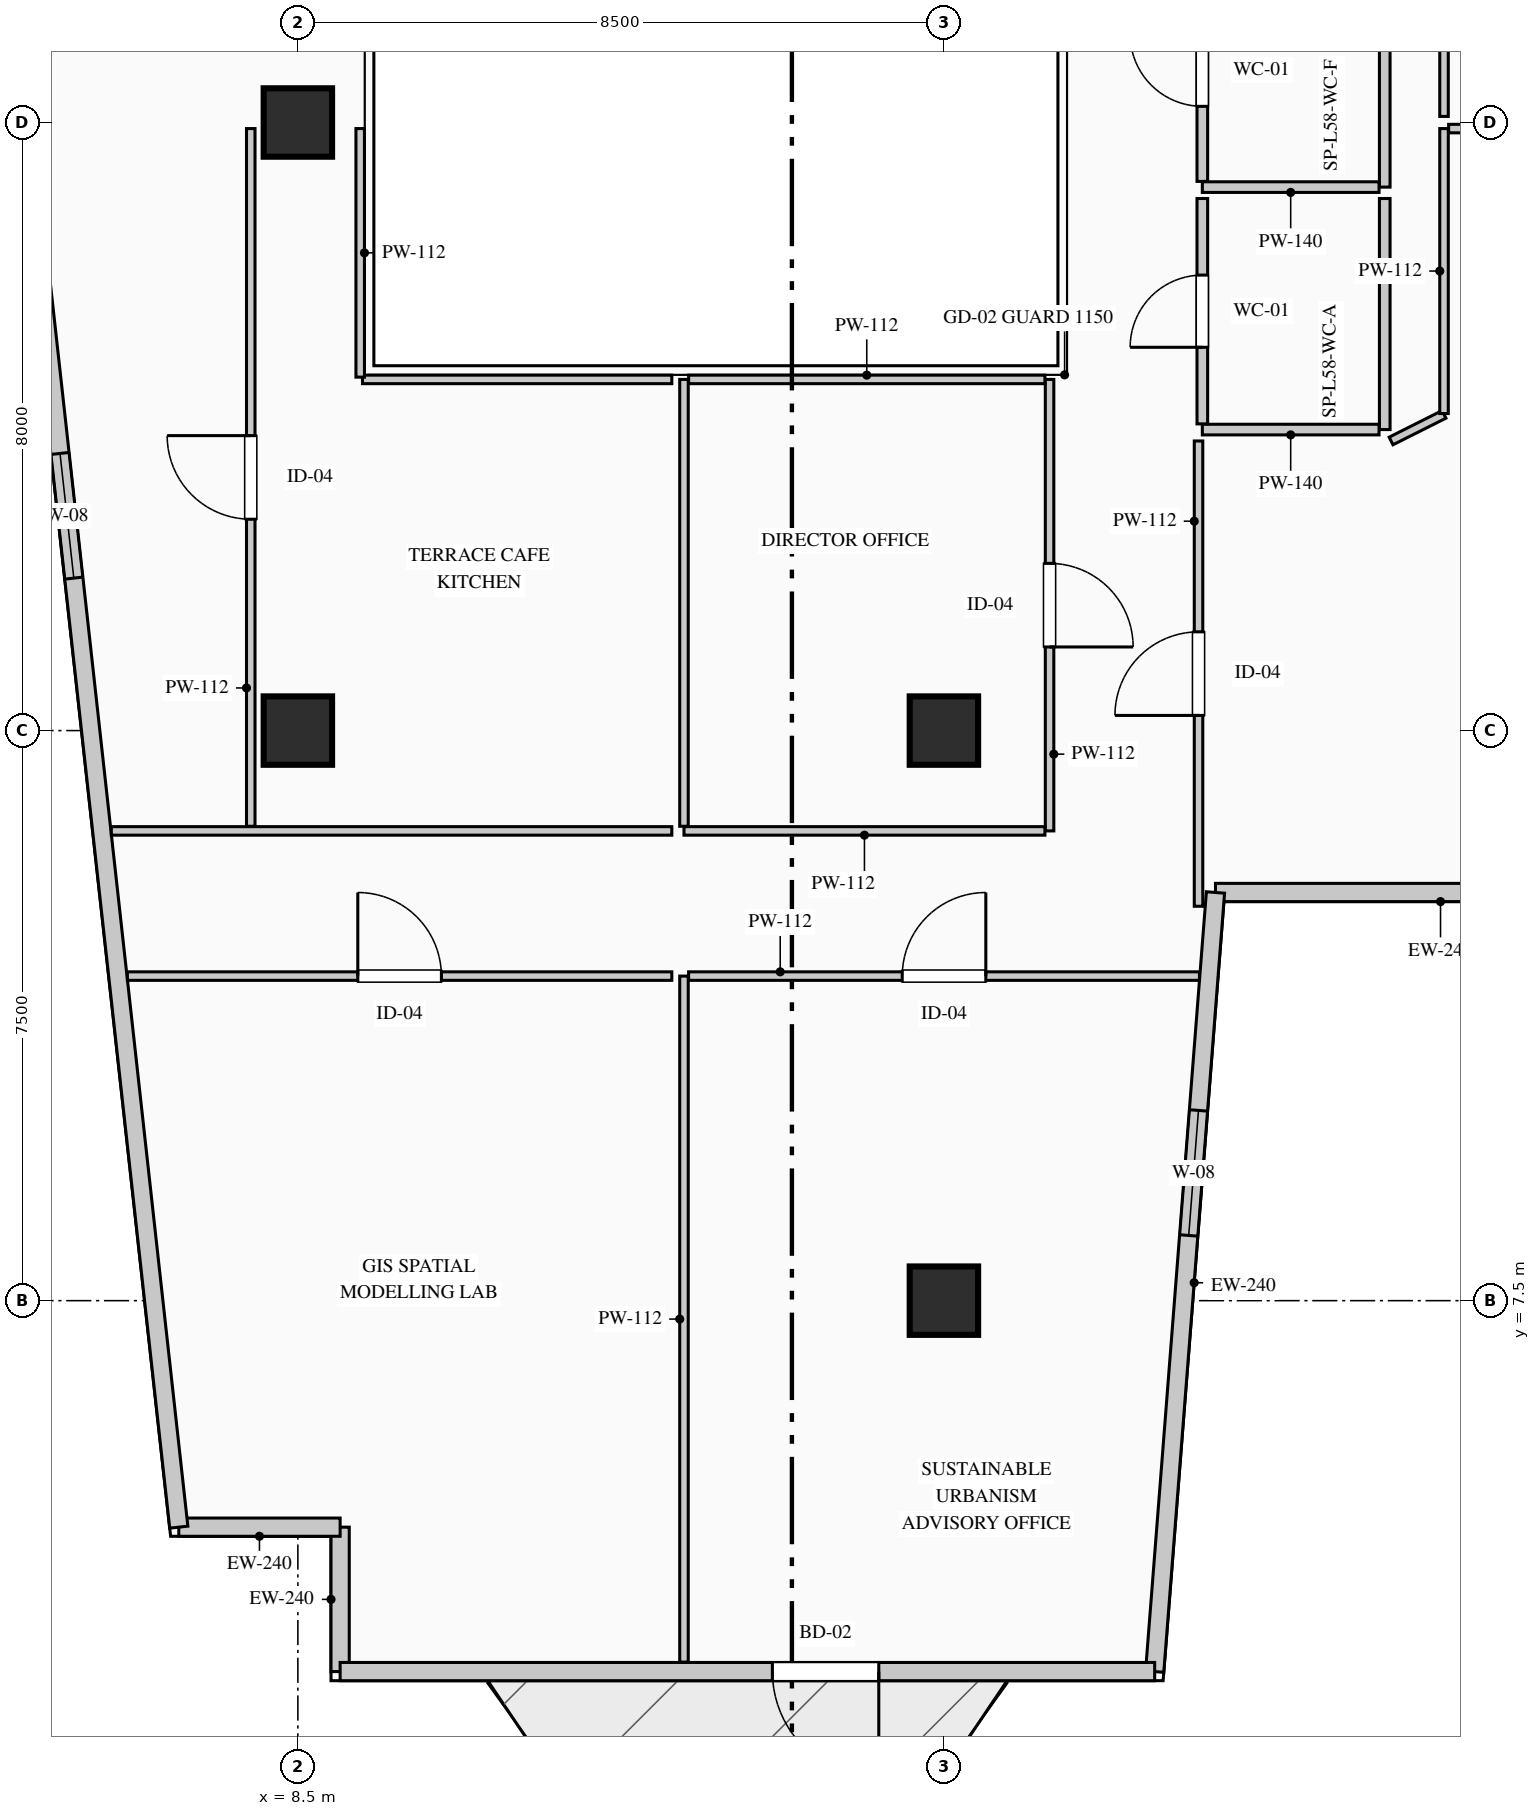
"""IFC4 building model, lengths in metres.
Left out: names, types, materials, properties, quantities, classifications, styles, units other than length and angle.
Written with IfcOpenShell. Run it as: python <this file> out.ifc"""

import sys

from ifc_helpers import new_model, si_unit, direction, frame, frame_2d, origin, origin_2d, place, context, subcontext, project, spatial, rectangle, extrude, element, fill, save


model = new_model("IFC4")
c1 = context("Model", 3, precision=1e-05, world=origin(), true_north=direction((0.0, 1.0)))
c2 = subcontext(c1, "Body", "Model", "MODEL_VIEW")
j1 = project(units=[si_unit("LENGTHUNIT", "METRE"), si_unit("PLANEANGLEUNIT", "RADIAN")], contexts=[c1])
p1 = place(None, origin())
s1 = spatial("IfcSite", under=j1, at=p1, CompositionType="ELEMENT")
p2 = place(p1, origin())
s2 = spatial("IfcBuilding", under=s1, at=p2, CompositionType="ELEMENT")
p3 = place(p2, frame((0.0, 0.0, 243.0)))
s3 = spatial("IfcBuildingStorey", under=s2, at=p3, CompositionType="ELEMENT", Elevation=243.0)
for number, where, z_axis, x_axis in (
    (1, (8.5, 15.0, 0.0), (0.0, 0.0, 1.0), (1.0, 0.0, 0.0)),
    (2, (8.5, 23.0, 0.0), (0.0, 0.0, 1.0), (1.0, 0.0, 0.0)),
    (3, (17.0, 7.5, 0.0), (0.0, 0.0, 1.0), (1.0, 0.0, 0.0)),
    (4, (17.0, 15.0, 0.0), (0.0, 0.0, 1.0), (1.0, 0.0, 0.0)),
):
    element("IfcColumn", number, at=place(p3, frame(where, z_axis=z_axis, x_axis=x_axis)), inside=s3, PredefinedType="COLUMN", context=c2, shape_type="SweptSolid", body=[
        extrude(rectangle(XDim=0.9, YDim=0.9, at=origin_2d()), origin(), (0.0, 0.0, 1.0), 3.95),
    ])
p4 = place(p3, frame((9.056, 2.62, 0.0), z_axis=(0.0, 0.0, 1.0), x_axis=(0.0, 1.0, 0.0)))
e5 = element("IfcWall", 5, at=p4, inside=s3, PredefinedType="STANDARD", context=c2, shape_type="SweptSolid", body=[
    extrude(rectangle(XDim=1.9, YDim=0.24, at=frame_2d((0.95, 0.0))), origin(), (0.0, 0.0, 1.0), 3.7),
])
p5 = place(p3, frame((9.056, 4.52, 0.0), z_axis=(0.0, 0.0, 1.0), x_axis=(-1.0, 0.0, 0.0)))
e6 = element("IfcWall", 6, at=p5, inside=s3, PredefinedType="STANDARD", context=c2, shape_type="SweptSolid", body=[
    extrude(rectangle(XDim=2.123, YDim=0.24, at=frame_2d((1.061, 0.0))), origin(), (0.0, 0.0, 1.0), 3.7),
])
p6 = place(p3, frame((6.933, 4.52, 0.0), z_axis=(0.0, 0.0, 1.0), x_axis=(-0.109965284523, 0.993935428587, 0.0)))
e7 = element("IfcWall", 7, at=p6, inside=s3, PredefinedType="STANDARD", context=c2, shape_type="SweptSolid", body=[
    extrude(rectangle(XDim=37.186, YDim=0.24, at=frame_2d((18.593, 0.0))), origin(), (0.0, 0.0, 1.0), 3.7),
])
p7 = place(p6, frame((12.562, 0.0, 0.9)))
e8 = element("IfcOpeningElement", 8, at=p7, cuts=e7, PredefinedType="OPENING", context=c2, shape_type="SweptSolid", body=[
    extrude(rectangle(XDim=1.65, YDim=1.95, at=frame_2d((0.825, 0.975))), frame((0.0, 0.13, 0.0), z_axis=(0.0, -1.0, 0.0), x_axis=(1.0, 0.0, 0.0)), (0.0, 0.0, 1.0), 0.26),
])
p8 = place(p3, frame((26.495, 12.87, 0.0), z_axis=(0.0, 0.0, 1.0), x_axis=(-1.0, 0.0, 0.0)))
e9 = element("IfcWall", 9, at=p8, inside=s3, PredefinedType="STANDARD", context=c2, shape_type="SweptSolid", body=[
    extrude(rectangle(XDim=5.922, YDim=0.24, at=frame_2d((2.961, 0.0))), origin(), (0.0, 0.0, 1.0), 3.7),
])
p9 = place(p3, frame((20.573, 12.87, 0.0), z_axis=(0.0, 0.0, 1.0), x_axis=(-0.077816860153, -0.996967670627, 0.0)))
e10 = element("IfcWall", 10, at=p9, inside=s3, PredefinedType="STANDARD", context=c2, shape_type="SweptSolid", body=[
    extrude(rectangle(XDim=10.281, YDim=0.24, at=frame_2d((5.141, 0.0))), origin(), (0.0, 0.0, 1.0), 3.7),
])
p10 = place(p9, frame((2.876, 0.0, 0.9)))
e11 = element("IfcOpeningElement", 11, at=p10, cuts=e10, PredefinedType="OPENING", context=c2, shape_type="SweptSolid", body=[
    extrude(rectangle(XDim=1.65, YDim=1.95, at=frame_2d((0.825, 0.975))), frame((0.0, 0.13, 0.0), z_axis=(0.0, -1.0, 0.0), x_axis=(1.0, 0.0, 0.0)), (0.0, 0.0, 1.0), 0.26),
])
p11 = place(p3, frame((19.773, 2.62, 0.0), z_axis=(0.0, 0.0, 1.0), x_axis=(-1.0, 0.0, 0.0)))
e12 = element("IfcWall", 12, at=p11, inside=s3, PredefinedType="STANDARD", context=c2, shape_type="SweptSolid", body=[
    extrude(rectangle(XDim=10.717, YDim=0.24, at=frame_2d((5.358, 0.0))), origin(), (0.0, 0.0, 1.0), 3.7),
])
p12 = place(p11, frame((3.63, 0.0, 0.0)))
e13 = element("IfcOpeningElement", 13, at=p12, cuts=e12, PredefinedType="OPENING", context=c2, shape_type="SweptSolid", body=[
    extrude(rectangle(XDim=1.4, YDim=2.2, at=frame_2d((0.7, 1.1))), frame((0.0, 0.13, 0.0), z_axis=(0.0, -1.0, 0.0), x_axis=(1.0, 0.0, 0.0)), (0.0, 0.0, 1.0), 0.26),
])
p13 = place(p3, frame((22.8, 25.15, 0.0), z_axis=(0.0, 0.0, 1.0), x_axis=(0.0, -1.0, 0.0)))
e14 = element("IfcWall", 14, at=p13, inside=s3, PredefinedType="PARTITIONING", context=c2, shape_type="SweptSolid", body=[
    extrude(rectangle(XDim=3.0, YDim=0.14, at=frame_2d((1.5, 0.0))), origin(), (0.0, 0.0, 1.0), 3.385),
])
p14 = place(p3, frame((22.725, 22.15, 0.0), z_axis=(0.0, 0.0, 1.0), x_axis=(-1.0, 0.0, 0.0)))
e15 = element("IfcWall", 15, at=p14, inside=s3, PredefinedType="PARTITIONING", context=c2, shape_type="SweptSolid", body=[
    extrude(rectangle(XDim=2.325, YDim=0.14, at=frame_2d((1.163, 0.0))), origin(), (0.0, 0.0, 1.0), 3.7),
])
p15 = place(p3, frame((20.4, 22.225, 0.0), z_axis=(0.0, 0.0, 1.0), x_axis=(0.0, 1.0, 0.0)))
e16 = element("IfcWall", 16, at=p15, inside=s3, PredefinedType="PARTITIONING", context=c2, shape_type="SweptSolid", body=[
    extrude(rectangle(XDim=2.925, YDim=0.14, at=frame_2d((1.462, 0.0))), origin(), (0.0, 0.0, 1.0), 3.7),
])
p16 = place(p15, frame((0.988, 0.0, 0.0)))
e17 = element("IfcOpeningElement", 17, at=p16, cuts=e16, PredefinedType="OPENING", context=c2, shape_type="SweptSolid", body=[
    extrude(rectangle(XDim=0.95, YDim=2.15, at=frame_2d((0.475, 1.075))), frame((0.0, 0.08, 0.0), z_axis=(0.0, -1.0, 0.0), x_axis=(1.0, 0.0, 0.0)), (0.0, 0.0, 1.0), 0.16),
])
p17 = place(p3, frame((22.8, 22.0, 0.0), z_axis=(0.0, 0.0, 1.0), x_axis=(0.0, -1.0, 0.0)))
e18 = element("IfcWall", 18, at=p17, inside=s3, PredefinedType="PARTITIONING", context=c2, shape_type="SweptSolid", body=[
    extrude(rectangle(XDim=3.04, YDim=0.14, at=frame_2d((1.52, 0.0))), origin(), (0.0, 0.0, 1.0), 3.385),
])
p18 = place(p3, frame((22.725, 18.96, 0.0), z_axis=(0.0, 0.0, 1.0), x_axis=(-1.0, 0.0, 0.0)))
e19 = element("IfcWall", 19, at=p18, inside=s3, PredefinedType="PARTITIONING", context=c2, shape_type="SweptSolid", body=[
    extrude(rectangle(XDim=2.325, YDim=0.14, at=frame_2d((1.163, 0.0))), origin(), (0.0, 0.0, 1.0), 3.7),
])
p19 = place(p3, frame((20.4, 19.035, 0.0), z_axis=(0.0, 0.0, 1.0), x_axis=(0.0, 1.0, 0.0)))
e20 = element("IfcWall", 20, at=p19, inside=s3, PredefinedType="PARTITIONING", context=c2, shape_type="SweptSolid", body=[
    extrude(rectangle(XDim=2.965, YDim=0.14, at=frame_2d((1.482, 0.0))), origin(), (0.0, 0.0, 1.0), 3.7),
])
p20 = place(p19, frame((1.008, 0.0, 0.0)))
e21 = element("IfcOpeningElement", 21, at=p20, cuts=e20, PredefinedType="OPENING", context=c2, shape_type="SweptSolid", body=[
    extrude(rectangle(XDim=0.95, YDim=2.15, at=frame_2d((0.475, 1.075))), frame((0.0, 0.08, 0.0), z_axis=(0.0, -1.0, 0.0), x_axis=(1.0, 0.0, 0.0)), (0.0, 0.0, 1.0), 0.16),
])
p21 = place(p3, frame((13.58, 2.745, 0.0), z_axis=(0.0, 0.0, 1.0), x_axis=(0.0, 1.0, 0.0)))
e22 = element("IfcWall", 22, at=p21, inside=s3, PredefinedType="PARTITIONING", context=c2, shape_type="SweptSolid", body=[
    extrude(rectangle(XDim=9.025, YDim=0.112, at=frame_2d((4.512, 0.0))), origin(), (0.0, 0.0, 1.0), 3.7),
])
p22 = place(p3, frame((13.641, 11.77, 0.0), z_axis=(0.0, 0.0, 1.0), x_axis=(1.0, 0.0, 0.0)))
e23 = element("IfcWall", 23, at=p22, inside=s3, PredefinedType="PARTITIONING", context=c2, shape_type="SweptSolid", body=[
    extrude(rectangle(XDim=6.721, YDim=0.112, at=frame_2d((3.36, 0.0))), origin(), (0.0, 0.0, 1.0), 3.7),
])
p23 = place(p22, frame((2.81, 0.0, 0.0)))
e24 = element("IfcOpeningElement", 24, at=p23, cuts=e23, PredefinedType="OPENING", context=c2, shape_type="SweptSolid", body=[
    extrude(rectangle(XDim=1.1, YDim=2.2, at=frame_2d((0.55, 1.1))), frame((0.0, 0.066, 0.0), z_axis=(0.0, -1.0, 0.0), x_axis=(1.0, 0.0, 0.0)), (0.0, 0.0, 1.0), 0.132),
])
p24 = place(p3, frame((6.257, 11.77, 0.0), z_axis=(0.0, 0.0, 1.0), x_axis=(1.0, 0.0, 0.0)))
e25 = element("IfcWall", 25, at=p24, inside=s3, PredefinedType="PARTITIONING", context=c2, shape_type="SweptSolid", body=[
    extrude(rectangle(XDim=7.163, YDim=0.112, at=frame_2d((3.582, 0.0))), origin(), (0.0, 0.0, 1.0), 3.7),
])
p25 = place(p24, frame((3.031, 0.0, 0.0)))
e26 = element("IfcOpeningElement", 26, at=p25, cuts=e25, PredefinedType="OPENING", context=c2, shape_type="SweptSolid", body=[
    extrude(rectangle(XDim=1.1, YDim=2.2, at=frame_2d((0.55, 1.1))), frame((0.0, 0.066, 0.0), z_axis=(0.0, -1.0, 0.0), x_axis=(1.0, 0.0, 0.0)), (0.0, 0.0, 1.0), 0.132),
])
p26 = place(p3, frame((18.39, 19.62, 0.0), z_axis=(0.0, 0.0, 1.0), x_axis=(0.0, -1.0, 0.0)))
e27 = element("IfcWall", 27, at=p26, inside=s3, PredefinedType="PARTITIONING", context=c2, shape_type="SweptSolid", body=[
    extrude(rectangle(XDim=5.94, YDim=0.112, at=frame_2d((2.97, 0.0))), origin(), (0.0, 0.0, 1.0), 3.7),
])
p27 = place(p26, frame((2.42, 0.0, 0.0)))
e28 = element("IfcOpeningElement", 28, at=p27, cuts=e27, PredefinedType="OPENING", context=c2, shape_type="SweptSolid", body=[
    extrude(rectangle(XDim=1.1, YDim=2.2, at=frame_2d((0.55, 1.1))), frame((0.0, 0.066, 0.0), z_axis=(0.0, -1.0, 0.0), x_axis=(1.0, 0.0, 0.0)), (0.0, 0.0, 1.0), 0.132),
])
p28 = place(p3, frame((18.329, 13.68, 0.0), z_axis=(0.0, 0.0, 1.0), x_axis=(-1.0, 0.0, 0.0)))
e29 = element("IfcWall", 29, at=p28, inside=s3, PredefinedType="PARTITIONING", context=c2, shape_type="SweptSolid", body=[
    extrude(rectangle(XDim=4.749, YDim=0.112, at=frame_2d((2.375, 0.0))), origin(), (0.0, 0.0, 1.0), 3.7),
])
p29 = place(p3, frame((13.58, 13.741, 0.0), z_axis=(0.0, 0.0, 1.0), x_axis=(0.0, 1.0, 0.0)))
e30 = element("IfcWall", 30, at=p29, inside=s3, PredefinedType="PARTITIONING", context=c2, shape_type="SweptSolid", body=[
    extrude(rectangle(XDim=5.879, YDim=0.112, at=frame_2d((2.939, 0.0))), origin(), (0.0, 0.0, 1.0), 3.7),
])
p30 = place(p3, frame((13.641, 19.62, 0.0), z_axis=(0.0, 0.0, 1.0), x_axis=(1.0, 0.0, 0.0)))
e31 = element("IfcWall", 31, at=p30, inside=s3, PredefinedType="PARTITIONING", context=c2, shape_type="SweptSolid", body=[
    extrude(rectangle(XDim=4.688, YDim=0.112, at=frame_2d((2.344, 0.0))), origin(), (0.0, 0.0, 1.0), 3.7),
])
p31 = place(p3, frame((20.35, 12.689, 0.0), z_axis=(0.0, 0.0, 1.0), x_axis=(0.0, 1.0, 0.0)))
e32 = element("IfcWall", 32, at=p31, inside=s3, PredefinedType="PARTITIONING", context=c2, shape_type="SweptSolid", body=[
    extrude(rectangle(XDim=6.121, YDim=0.112, at=frame_2d((3.061, 0.0))), origin(), (0.0, 0.0, 1.0), 3.7),
])
p32 = place(p31, frame((2.511, 0.0, 0.0)))
e33 = element("IfcOpeningElement", 33, at=p32, cuts=e32, PredefinedType="OPENING", context=c2, shape_type="SweptSolid", body=[
    extrude(rectangle(XDim=1.1, YDim=2.2, at=frame_2d((0.55, 1.1))), frame((0.0, 0.066, 0.0), z_axis=(0.0, -1.0, 0.0), x_axis=(1.0, 0.0, 0.0)), (0.0, 0.0, 1.0), 0.132),
])
p33 = place(p3, frame((22.883, 18.81, 0.0), z_axis=(0.0, 0.0, 1.0), x_axis=(0.893737436086, 0.448590453909, 0.0)))
e34 = element("IfcWall", 34, at=p33, inside=s3, PredefinedType="PARTITIONING", context=c2, shape_type="SweptSolid", body=[
    extrude(rectangle(XDim=0.78, YDim=0.112, at=frame_2d((0.39, 0.0))), origin(), (0.0, 0.0, 1.0), 3.7),
])
p34 = place(p3, frame((23.58, 19.171, 0.0), z_axis=(0.0, 0.0, 1.0), x_axis=(0.0, 1.0, 0.0)))
e35 = element("IfcWall", 35, at=p34, inside=s3, PredefinedType="PARTITIONING", context=c2, shape_type="SweptSolid", body=[
    extrude(rectangle(XDim=3.749, YDim=0.112, at=frame_2d((1.875, 0.0))), origin(), (0.0, 0.0, 1.0), 3.7),
])
p35 = place(p3, frame((23.641, 22.92, 0.0), z_axis=(0.0, 0.0, 1.0), x_axis=(1.0, 0.0, 0.0)))
e36 = element("IfcWall", 36, at=p35, inside=s3, PredefinedType="PARTITIONING", context=c2, shape_type="SweptSolid", body=[
    extrude(rectangle(XDim=2.348, YDim=0.112, at=frame_2d((1.174, 0.0))), origin(), (0.0, 0.0, 1.0), 3.7),
])
p36 = place(p3, frame((9.35, 19.62, 0.0), z_axis=(0.0, 0.0, 1.0), x_axis=(1.0, 0.0, 0.0)))
e37 = element("IfcWall", 37, at=p36, inside=s3, PredefinedType="PARTITIONING", context=c2, shape_type="SweptSolid", body=[
    extrude(rectangle(XDim=4.07, YDim=0.112, at=frame_2d((2.035, 0.0))), origin(), (0.0, 0.0, 1.0), 3.7),
])
p37 = place(p3, frame((13.42, 13.68, 0.0), z_axis=(0.0, 0.0, 1.0), x_axis=(-1.0, 0.0, 0.0)))
e38 = element("IfcWall", 38, at=p37, inside=s3, PredefinedType="PARTITIONING", context=c2, shape_type="SweptSolid", body=[
    extrude(rectangle(XDim=7.374, YDim=0.112, at=frame_2d((3.687, 0.0))), origin(), (0.0, 0.0, 1.0), 3.7),
])
p38 = place(p3, frame((7.88, 13.741, 0.0), z_axis=(0.0, 0.0, 1.0), x_axis=(0.0, 1.0, 0.0)))
e39 = element("IfcWall", 39, at=p38, inside=s3, PredefinedType="PARTITIONING", context=c2, shape_type="SweptSolid", body=[
    extrude(rectangle(XDim=9.179, YDim=0.112, at=frame_2d((4.589, 0.0))), origin(), (0.0, 0.0, 1.0), 3.7),
])
p39 = place(p38, frame((4.04, 0.0, 0.0)))
e40 = element("IfcOpeningElement", 40, at=p39, cuts=e39, PredefinedType="OPENING", context=c2, shape_type="SweptSolid", body=[
    extrude(rectangle(XDim=1.1, YDim=2.2, at=frame_2d((0.55, 1.1))), frame((0.0, 0.066, 0.0), z_axis=(0.0, -1.0, 0.0), x_axis=(1.0, 0.0, 0.0)), (0.0, 0.0, 1.0), 0.132),
])
p40 = place(p3, frame((9.32, 22.92, 0.0), z_axis=(0.0, 0.0, 1.0), x_axis=(0.0, -1.0, 0.0)))
e41 = element("IfcWall", 41, at=p40, inside=s3, PredefinedType="PARTITIONING", context=c2, shape_type="SweptSolid", body=[
    extrude(rectangle(XDim=3.27, YDim=0.112, at=frame_2d((1.635, 0.0))), origin(), (0.0, 0.0, 1.0), 3.385),
])
p41 = place(p3, frame((23.58, 23.08, 0.0), z_axis=(0.0, 0.0, 1.0), x_axis=(0.0, 1.0, 0.0)))
e42 = element("IfcWall", 42, at=p41, inside=s3, PredefinedType="PARTITIONING", context=c2, shape_type="SweptSolid", body=[
    extrude(rectangle(XDim=5.94, YDim=0.112, at=frame_2d((2.97, 0.0))), origin(), (0.0, 0.0, 1.0), 3.7),
])
p42 = place(p7, origin())
e43 = element("IfcWindow", 43, at=p42, inside=s3, PartitioningType="SINGLE_PANEL", PredefinedType="WINDOW", context=c2, shape_type="SweptSolid", body=[
    extrude(rectangle(XDim=1.65, YDim=1.95, at=frame_2d((0.825, 0.975))), frame((0.0, 0.03, 0.0), z_axis=(0.0, -1.0, 0.0), x_axis=(1.0, 0.0, 0.0)), (0.0, 0.0, 1.0), 0.06),
])
fill(e8, e43)
p43 = place(p10, origin())
e44 = element("IfcWindow", 44, at=p43, inside=s3, PartitioningType="SINGLE_PANEL", PredefinedType="WINDOW", context=c2, shape_type="SweptSolid", body=[
    extrude(rectangle(XDim=1.65, YDim=1.95, at=frame_2d((0.825, 0.975))), frame((0.0, 0.03, 0.0), z_axis=(0.0, -1.0, 0.0), x_axis=(1.0, 0.0, 0.0)), (0.0, 0.0, 1.0), 0.06),
])
fill(e11, e44)
p44 = place(p12, origin())
e45 = element("IfcDoor", 45, at=p44, inside=s3, OperationType="SINGLE_SWING_LEFT", PredefinedType="DOOR", context=c2, shape_type="SweptSolid", body=[
    extrude(rectangle(XDim=1.4, YDim=2.2, at=frame_2d((0.7, 1.1))), frame((0.0, 0.025, 0.0), z_axis=(0.0, -1.0, 0.0), x_axis=(1.0, 0.0, 0.0)), (0.0, 0.0, 1.0), 0.05),
])
fill(e13, e45)
p45 = place(p16, origin())
e46 = element("IfcDoor", 46, at=p45, inside=s3, OperationType="SINGLE_SWING_RIGHT", PredefinedType="DOOR", context=c2, shape_type="SweptSolid", body=[
    extrude(rectangle(XDim=0.95, YDim=2.15, at=frame_2d((0.475, 1.075))), frame((0.0, 0.025, 0.0), z_axis=(0.0, -1.0, 0.0), x_axis=(1.0, 0.0, 0.0)), (0.0, 0.0, 1.0), 0.05),
])
fill(e17, e46)
p46 = place(p20, origin())
e47 = element("IfcDoor", 47, at=p46, inside=s3, OperationType="SINGLE_SWING_LEFT", PredefinedType="DOOR", context=c2, shape_type="SweptSolid", body=[
    extrude(rectangle(XDim=0.95, YDim=2.15, at=frame_2d((0.475, 1.075))), frame((0.0, 0.025, 0.0), z_axis=(0.0, -1.0, 0.0), x_axis=(1.0, 0.0, 0.0)), (0.0, 0.0, 1.0), 0.05),
])
fill(e21, e47)
p47 = place(p23, origin())
e48 = element("IfcDoor", 48, at=p47, inside=s3, OperationType="SINGLE_SWING_RIGHT", PredefinedType="DOOR", context=c2, shape_type="SweptSolid", body=[
    extrude(rectangle(XDim=1.1, YDim=2.2, at=frame_2d((0.55, 1.1))), frame((0.0, 0.025, 0.0), z_axis=(0.0, -1.0, 0.0), x_axis=(1.0, 0.0, 0.0)), (0.0, 0.0, 1.0), 0.05),
])
fill(e24, e48)
p48 = place(p25, origin())
e49 = element("IfcDoor", 49, at=p48, inside=s3, OperationType="SINGLE_SWING_LEFT", PredefinedType="DOOR", context=c2, shape_type="SweptSolid", body=[
    extrude(rectangle(XDim=1.1, YDim=2.2, at=frame_2d((0.55, 1.1))), frame((0.0, 0.025, 0.0), z_axis=(0.0, -1.0, 0.0), x_axis=(1.0, 0.0, 0.0)), (0.0, 0.0, 1.0), 0.05),
])
fill(e26, e49)
p49 = place(p27, origin())
e50 = element("IfcDoor", 50, at=p49, inside=s3, OperationType="SINGLE_SWING_RIGHT", PredefinedType="DOOR", context=c2, shape_type="SweptSolid", body=[
    extrude(rectangle(XDim=1.1, YDim=2.2, at=frame_2d((0.55, 1.1))), frame((0.0, 0.025, 0.0), z_axis=(0.0, -1.0, 0.0), x_axis=(1.0, 0.0, 0.0)), (0.0, 0.0, 1.0), 0.05),
])
fill(e28, e50)
p50 = place(p32, origin())
e51 = element("IfcDoor", 51, at=p50, inside=s3, OperationType="SINGLE_SWING_LEFT", PredefinedType="DOOR", context=c2, shape_type="SweptSolid", body=[
    extrude(rectangle(XDim=1.1, YDim=2.2, at=frame_2d((0.55, 1.1))), frame((0.0, 0.025, 0.0), z_axis=(0.0, -1.0, 0.0), x_axis=(1.0, 0.0, 0.0)), (0.0, 0.0, 1.0), 0.05),
])
fill(e33, e51)
p51 = place(p39, origin())
e52 = element("IfcDoor", 52, at=p51, inside=s3, OperationType="SINGLE_SWING_RIGHT", PredefinedType="DOOR", context=c2, shape_type="SweptSolid", body=[
    extrude(rectangle(XDim=1.1, YDim=2.2, at=frame_2d((0.55, 1.1))), frame((0.0, 0.025, 0.0), z_axis=(0.0, -1.0, 0.0), x_axis=(1.0, 0.0, 0.0)), (0.0, 0.0, 1.0), 0.05),
])
fill(e40, e52)
save(model, sys.argv[1])
